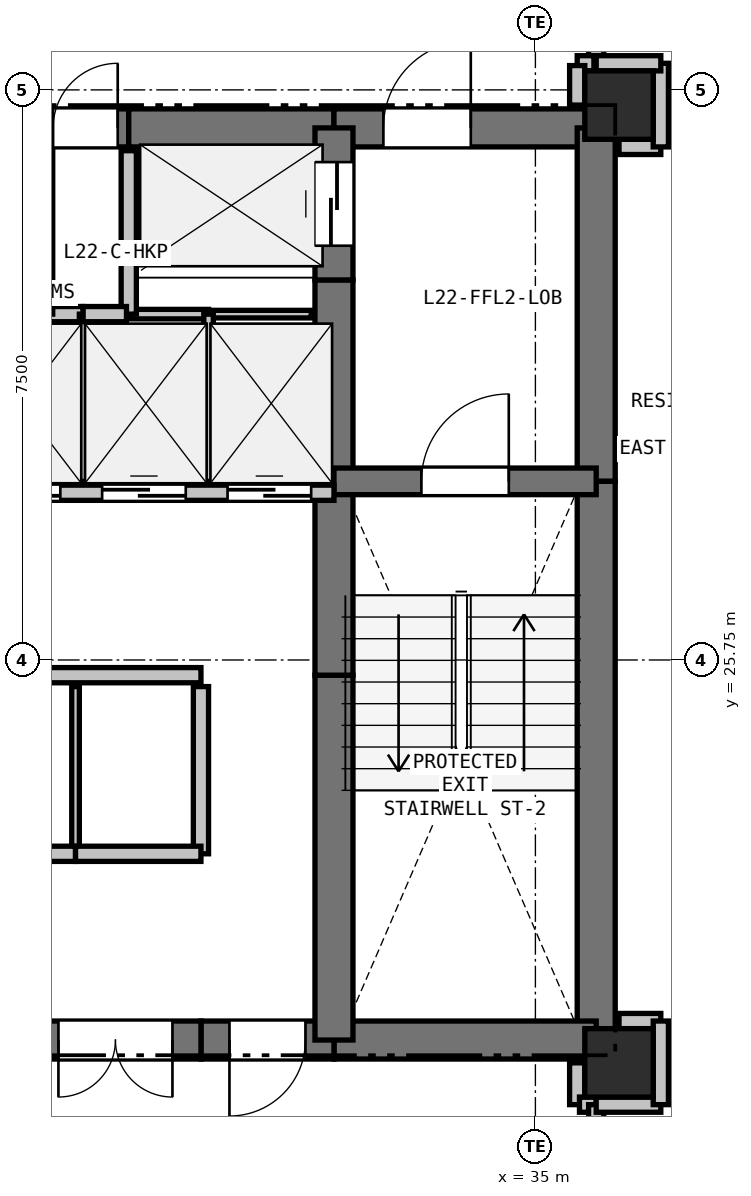
"""IFC4 building model, lengths in metres.
Left out: names, types, materials, properties, quantities, classifications, styles, units other than length and angle.
Written with IfcOpenShell. Run it as: python <this file> out.ifc"""

import sys

from ifc_helpers import new_model, si_unit, direction, frame, frame_2d, origin, origin_2d, place, context, subcontext, project, spatial, rectangle, extrude, element, fill, save


model = new_model("IFC4")
c1 = context("Model", 3, precision=1e-05, world=origin(), true_north=direction((0.0, 1.0)))
c2 = subcontext(c1, "Body", "Model", "MODEL_VIEW")
j1 = project(units=[si_unit("LENGTHUNIT", "METRE"), si_unit("PLANEANGLEUNIT", "RADIAN")], contexts=[c1])
p1 = place(None, origin())
s1 = spatial("IfcSite", under=j1, at=p1, CompositionType="ELEMENT")
p2 = place(p1, origin())
s2 = spatial("IfcBuilding", under=s1, at=p2, CompositionType="ELEMENT")
p3 = place(p2, frame((0.0, 0.0, 83.4)))
s3 = spatial("IfcBuildingStorey", under=s2, at=p3, CompositionType="ELEMENT", Elevation=83.4)
for number, where, z_axis, x_axis in (
    (1, (36.1, 33.05, 0.0), (0.0, 0.0, 1.0), (1.0, 0.0, 0.0)),
    (2, (36.1, 20.45, 0.0), (0.0, 0.0, 1.0), (1.0, 0.0, 0.0)),
):
    element("IfcColumn", number, at=place(p3, frame(where, z_axis=z_axis, x_axis=x_axis)), inside=s3, PredefinedType="COLUMN", context=c2, shape_type="SweptSolid", body=[
        extrude(rectangle(XDim=0.9, YDim=0.9, at=origin_2d()), origin(), (0.0, 0.0, 1.0), 3.3),
    ])
p4 = place(p3, frame((27.4, 32.75, 0.0), z_axis=(0.0, 0.0, 1.0), x_axis=(1.0, 0.0, 0.0)))
e3 = element("IfcWall", 3, at=p4, inside=s3, PredefinedType="SHEAR", context=c2, shape_type="SweptSolid", body=[
    extrude(rectangle(XDim=2.25, YDim=0.5, at=frame_2d((1.125, 0.0))), origin(), (0.0, 0.0, 1.0), 3.05),
])
p5 = place(p4, frame((0.17, 0.0, 0.0)))
e4 = element("IfcOpeningElement", 4, at=p5, cuts=e3, PredefinedType="OPENING", context=c2, shape_type="SweptSolid", body=[
    extrude(rectangle(XDim=0.85, YDim=2.1, at=frame_2d((0.425, 1.05))), frame((0.0, 0.26, 0.0), z_axis=(0.0, -1.0, 0.0), x_axis=(1.0, 0.0, 0.0)), (0.0, 0.0, 1.0), 0.52),
])
p6 = place(p4, frame((1.255, 0.0, 0.0)))
e5 = element("IfcOpeningElement", 5, at=p6, cuts=e3, PredefinedType="OPENING", context=c2, shape_type="SweptSolid", body=[
    extrude(rectangle(XDim=0.85, YDim=2.1, at=frame_2d((0.425, 1.05))), frame((0.0, 0.26, 0.0), z_axis=(0.0, -1.0, 0.0), x_axis=(1.0, 0.0, 0.0)), (0.0, 0.0, 1.0), 0.52),
])
p7 = place(p3, frame((29.65, 32.75, 0.0), z_axis=(0.0, 0.0, 1.0), x_axis=(1.0, 0.0, 0.0)))
e6 = element("IfcWall", 6, at=p7, inside=s3, PredefinedType="SHEAR", context=c2, shape_type="SweptSolid", body=[
    extrude(rectangle(XDim=2.7, YDim=0.5, at=frame_2d((1.35, 0.0))), origin(), (0.0, 0.0, 1.0), 3.05),
])
p8 = place(p3, frame((32.35, 32.75, 0.0), z_axis=(0.0, 0.0, 1.0), x_axis=(1.0, 0.0, 0.0)))
e7 = element("IfcWall", 7, at=p8, inside=s3, PredefinedType="SHEAR", context=c2, shape_type="SweptSolid", body=[
    extrude(rectangle(XDim=3.45, YDim=0.5, at=frame_2d((1.725, 0.0))), origin(), (0.0, 0.0, 1.0), 3.05),
])
p9 = place(p8, frame((0.65, 0.0, 0.0)))
e8 = element("IfcOpeningElement", 8, at=p9, cuts=e7, PredefinedType="OPENING", context=c2, shape_type="SweptSolid", body=[
    extrude(rectangle(XDim=1.15, YDim=2.15, at=frame_2d((0.575, 1.075))), frame((0.0, 0.26, 0.0), z_axis=(0.0, -1.0, 0.0), x_axis=(1.0, 0.0, 0.0)), (0.0, 0.0, 1.0), 0.52),
])
p10 = place(p3, frame((35.8, 32.75, 0.0), z_axis=(0.0, 0.0, 1.0), x_axis=(0.0, -1.0, 0.0)))
e9 = element("IfcWall", 9, at=p10, inside=s3, PredefinedType="SHEAR", context=c2, shape_type="SweptSolid", body=[
    extrude(rectangle(XDim=4.65, YDim=0.5, at=frame_2d((2.325, 0.0))), origin(), (0.0, 0.0, 1.0), 3.05),
])
p11 = place(p3, frame((35.8, 28.1, 0.0), z_axis=(0.0, 0.0, 1.0), x_axis=(0.0, -1.0, 0.0)))
e10 = element("IfcWall", 10, at=p11, inside=s3, PredefinedType="SHEAR", context=c2, shape_type="SweptSolid", body=[
    extrude(rectangle(XDim=7.35, YDim=0.5, at=frame_2d((3.675, 0.0))), origin(), (0.0, 0.0, 1.0), 3.05),
])
p12 = place(p3, frame((35.8, 20.75, 0.0), z_axis=(0.0, 0.0, 1.0), x_axis=(-1.0, 0.0, 0.0)))
e11 = element("IfcWall", 11, at=p12, inside=s3, PredefinedType="SHEAR", context=c2, shape_type="SweptSolid", body=[
    extrude(rectangle(XDim=3.45, YDim=0.5, at=frame_2d((1.725, 0.0))), origin(), (0.0, 0.0, 1.0), 3.05),
])
p13 = place(p3, frame((32.35, 20.75, 0.0), z_axis=(0.0, 0.0, 1.0), x_axis=(-1.0, 0.0, 0.0)))
e12 = element("IfcWall", 12, at=p13, inside=s3, PredefinedType="SHEAR", context=c2, shape_type="SweptSolid", body=[
    extrude(rectangle(XDim=1.75, YDim=0.5, at=frame_2d((0.875, 0.0))), origin(), (0.0, 0.0, 1.0), 3.05),
])
p14 = place(p13, frame((0.375, 0.0, 0.0)))
e13 = element("IfcOpeningElement", 13, at=p14, cuts=e12, PredefinedType="OPENING", context=c2, shape_type="SweptSolid", body=[
    extrude(rectangle(XDim=1.0, YDim=2.15, at=frame_2d((0.5, 1.075))), frame((0.0, 0.26, 0.0), z_axis=(0.0, -1.0, 0.0), x_axis=(1.0, 0.0, 0.0)), (0.0, 0.0, 1.0), 0.52),
])
p15 = place(p3, frame((30.6, 20.75, 0.0), z_axis=(0.0, 0.0, 1.0), x_axis=(-1.0, 0.0, 0.0)))
e14 = element("IfcWall", 14, at=p15, inside=s3, PredefinedType="SHEAR", context=c2, shape_type="SweptSolid", body=[
    extrude(rectangle(XDim=2.25, YDim=0.5, at=frame_2d((1.125, 0.0))), origin(), (0.0, 0.0, 1.0), 3.05),
])
p16 = place(p15, frame((0.375, 0.0, 0.0)))
e15 = element("IfcOpeningElement", 15, at=p16, cuts=e14, PredefinedType="OPENING", context=c2, shape_type="SweptSolid", body=[
    extrude(rectangle(XDim=1.5, YDim=2.2, at=frame_2d((0.75, 1.1))), frame((0.0, 0.26, 0.0), z_axis=(0.0, -1.0, 0.0), x_axis=(1.0, 0.0, 0.0)), (0.0, 0.0, 1.0), 0.52),
])
p17 = place(p3, frame((32.35, 20.75, 0.0), z_axis=(0.0, 0.0, 1.0), x_axis=(0.0, 1.0, 0.0)))
e16 = element("IfcWall", 16, at=p17, inside=s3, PredefinedType="SHEAR", context=c2, shape_type="SweptSolid", body=[
    extrude(rectangle(XDim=4.8, YDim=0.5, at=frame_2d((2.4, 0.0))), origin(), (0.0, 0.0, 1.0), 3.05),
])
p18 = place(p3, frame((32.35, 25.55, 0.0), z_axis=(0.0, 0.0, 1.0), x_axis=(0.0, 1.0, 0.0)))
e17 = element("IfcWall", 17, at=p18, inside=s3, PredefinedType="SHEAR", context=c2, shape_type="SweptSolid", body=[
    extrude(rectangle(XDim=2.4, YDim=0.5, at=frame_2d((1.2, 0.0))), origin(), (0.0, 0.0, 1.0), 3.05),
])
p19 = place(p3, frame((32.35, 27.95, 0.0), z_axis=(0.0, 0.0, 1.0), x_axis=(0.0, 1.0, 0.0)))
e18 = element("IfcWall", 18, at=p19, inside=s3, PredefinedType="SHEAR", context=c2, shape_type="SweptSolid", body=[
    extrude(rectangle(XDim=2.8, YDim=0.5, at=frame_2d((1.4, 0.0))), origin(), (0.0, 0.0, 1.0), 3.05),
])
p20 = place(p3, frame((32.35, 30.75, 0.0), z_axis=(0.0, 0.0, 1.0), x_axis=(0.0, 1.0, 0.0)))
e19 = element("IfcWall", 19, at=p20, inside=s3, PredefinedType="SHEAR", context=c2, shape_type="SweptSolid", body=[
    extrude(rectangle(XDim=2.0, YDim=0.5, at=frame_2d((1.0, 0.0))), origin(), (0.0, 0.0, 1.0), 3.05),
])
p21 = place(p20, frame((0.45, 0.0, 0.0)))
e20 = element("IfcOpeningElement", 20, at=p21, cuts=e19, PredefinedType="OPENING", context=c2, shape_type="SweptSolid", body=[
    extrude(rectangle(XDim=1.1, YDim=2.15, at=frame_2d((0.55, 1.075))), frame((0.0, 0.26, 0.0), z_axis=(0.0, -1.0, 0.0), x_axis=(1.0, 0.0, 0.0)), (0.0, 0.0, 1.0), 0.52),
])
p22 = place(p3, frame((32.35, 28.1, 0.0), z_axis=(0.0, 0.0, 1.0), x_axis=(1.0, 0.0, 0.0)))
e21 = element("IfcWall", 21, at=p22, inside=s3, PredefinedType="SHEAR", context=c2, shape_type="SweptSolid", body=[
    extrude(rectangle(XDim=3.45, YDim=0.35, at=frame_2d((1.725, 0.0))), origin(), (0.0, 0.0, 1.0), 3.05),
])
p23 = place(p22, frame((1.15, 0.0, 0.0)))
e22 = element("IfcOpeningElement", 22, at=p23, cuts=e21, PredefinedType="OPENING", context=c2, shape_type="SweptSolid", body=[
    extrude(rectangle(XDim=1.15, YDim=2.15, at=frame_2d((0.575, 1.075))), frame((0.0, 0.185, 0.0), z_axis=(0.0, -1.0, 0.0), x_axis=(1.0, 0.0, 0.0)), (0.0, 0.0, 1.0), 0.37),
])
p24 = place(p3, frame((25.65, 25.55, 0.0), z_axis=(0.0, 0.0, 1.0), x_axis=(1.0, 0.0, 0.0)))
e23 = element("IfcWall", 23, at=p24, inside=s3, PredefinedType="PARTITIONING", context=c2, shape_type="SweptSolid", body=[
    extrude(rectangle(XDim=4.95, YDim=0.2, at=frame_2d((2.475, 0.0))), origin(), (0.0, 0.0, 1.0), 3.05),
])
p25 = place(p3, frame((27.4, 27.95, 0.0), z_axis=(0.0, 0.0, 1.0), x_axis=(1.0, 0.0, 0.0)))
e24 = element("IfcWall", 24, at=p25, inside=s3, PredefinedType="PARTITIONING", context=c2, shape_type="SweptSolid", body=[
    extrude(rectangle(XDim=4.95, YDim=0.2, at=frame_2d((2.475, 0.0))), origin(), (0.0, 0.0, 1.0), 3.05),
])
p26 = place(p25, frame((0.25, 0.0, 0.0)))
e25 = element("IfcOpeningElement", 25, at=p26, cuts=e24, PredefinedType="OPENING", context=c2, shape_type="SweptSolid", body=[
    extrude(rectangle(XDim=1.1, YDim=2.15, at=frame_2d((0.55, 1.075))), frame((0.0, 0.11, 0.0), z_axis=(0.0, -1.0, 0.0), x_axis=(1.0, 0.0, 0.0)), (0.0, 0.0, 1.0), 0.22),
])
p27 = place(p25, frame((1.9, 0.0, 0.0)))
e26 = element("IfcOpeningElement", 26, at=p27, cuts=e24, PredefinedType="OPENING", context=c2, shape_type="SweptSolid", body=[
    extrude(rectangle(XDim=1.1, YDim=2.15, at=frame_2d((0.55, 1.075))), frame((0.0, 0.11, 0.0), z_axis=(0.0, -1.0, 0.0), x_axis=(1.0, 0.0, 0.0)), (0.0, 0.0, 1.0), 0.22),
])
p28 = place(p25, frame((3.55, 0.0, 0.0)))
e27 = element("IfcOpeningElement", 27, at=p28, cuts=e24, PredefinedType="OPENING", context=c2, shape_type="SweptSolid", body=[
    extrude(rectangle(XDim=1.1, YDim=2.15, at=frame_2d((0.55, 1.075))), frame((0.0, 0.11, 0.0), z_axis=(0.0, -1.0, 0.0), x_axis=(1.0, 0.0, 0.0)), (0.0, 0.0, 1.0), 0.22),
])
p29 = place(p3, frame((32.05, 30.3, 0.0), z_axis=(0.0, 0.0, 1.0), x_axis=(-1.0, 0.0, 0.0)))
e28 = element("IfcWall", 28, at=p29, inside=s3, PredefinedType="PARTITIONING", context=c2, shape_type="SweptSolid", body=[
    extrude(rectangle(XDim=1.35, YDim=0.1, at=frame_2d((0.675, 0.0))), origin(), (0.0, 0.0, 1.0), 3.05),
])
p30 = place(p3, frame((30.7, 30.3, 0.0), z_axis=(0.0, 0.0, 1.0), x_axis=(-1.0, 0.0, 0.0)))
e29 = element("IfcWall", 29, at=p30, inside=s3, PredefinedType="PARTITIONING", context=c2, shape_type="SweptSolid", body=[
    extrude(rectangle(XDim=1.05, YDim=0.125, at=frame_2d((0.525, 0.0))), origin(), (0.0, 0.0, 1.0), 3.05),
])
p31 = place(p3, frame((29.65, 30.3, 0.0), z_axis=(0.0, 0.0, 1.0), x_axis=(0.0, 1.0, 0.0)))
e30 = element("IfcWall", 30, at=p31, inside=s3, PredefinedType="PARTITIONING", context=c2, shape_type="SweptSolid", body=[
    extrude(rectangle(XDim=2.15, YDim=0.2, at=frame_2d((1.075, 0.0))), origin(), (0.0, 0.0, 1.0), 3.05),
])
p32 = place(p3, frame((28.95, 25.4, 0.0), z_axis=(0.0, 0.0, 1.0), x_axis=(0.0, -1.0, 0.0)))
e31 = element("IfcWall", 31, at=p32, inside=s3, PredefinedType="PARTITIONING", context=c2, shape_type="SweptSolid", body=[
    extrude(rectangle(XDim=2.2, YDim=0.1, at=frame_2d((1.1, 0.0))), origin(), (0.0, 0.0, 1.0), 3.05),
])
p33 = place(p3, frame((28.95, 23.2, 0.0), z_axis=(0.0, 0.0, 1.0), x_axis=(-1.0, 0.0, 0.0)))
e32 = element("IfcWall", 32, at=p33, inside=s3, PredefinedType="PARTITIONING", context=c2, shape_type="SweptSolid", body=[
    extrude(rectangle(XDim=0.57, YDim=0.2, at=frame_2d((0.285, 0.0))), origin(), (0.0, 0.0, 1.0), 3.05),
])
p34 = place(p3, frame((30.6, 25.4, 0.0), z_axis=(0.0, 0.0, 1.0), x_axis=(0.0, -1.0, 0.0)))
e33 = element("IfcWall", 33, at=p34, inside=s3, PredefinedType="PARTITIONING", context=c2, shape_type="SweptSolid", body=[
    extrude(rectangle(XDim=2.2, YDim=0.2, at=frame_2d((1.1, 0.0))), origin(), (0.0, 0.0, 1.0), 3.05),
])
p35 = place(p3, frame((30.6, 23.2, 0.0), z_axis=(0.0, 0.0, 1.0), x_axis=(-1.0, 0.0, 0.0)))
e34 = element("IfcWall", 34, at=p35, inside=s3, PredefinedType="PARTITIONING", context=c2, shape_type="SweptSolid", body=[
    extrude(rectangle(XDim=1.65, YDim=0.2, at=frame_2d((0.825, 0.0))), origin(), (0.0, 0.0, 1.0), 3.05),
])
p36 = place(p3, frame((28.55, 30.3, 0.0), z_axis=(0.0, 0.0, 1.0), x_axis=(1.0, 0.0, 0.0)))
e35 = element("IfcWall", 35, at=p36, inside=s3, PredefinedType="PARTITIONING", context=c2, shape_type="SweptSolid", body=[
    extrude(rectangle(XDim=0.5, YDim=0.2, at=frame_2d((0.25, 0.0))), origin(), (0.0, 0.0, 1.0), 3.05),
])
p37 = place(p3, frame((29.05, 30.3, 0.0), z_axis=(0.0, 0.0, 1.0), x_axis=(0.0, -1.0, 0.0)))
e36 = element("IfcWall", 36, at=p37, inside=s3, PredefinedType="PARTITIONING", context=c2, shape_type="SweptSolid", body=[
    extrude(rectangle(XDim=2.2, YDim=0.1, at=frame_2d((1.1, 0.0))), origin(), (0.0, 0.0, 1.0), 3.05),
])
p38 = place(p3, frame((29.05, 30.3, 0.0), z_axis=(0.0, 0.0, 1.0), x_axis=(1.0, 0.0, 0.0)))
e37 = element("IfcWall", 37, at=p38, inside=s3, PredefinedType="PARTITIONING", context=c2, shape_type="SweptSolid", body=[
    extrude(rectangle(XDim=0.57, YDim=0.2, at=frame_2d((0.285, 0.0))), origin(), (0.0, 0.0, 1.0), 3.05),
])
p39 = place(p3, frame((30.7, 30.3, 0.0), z_axis=(0.0, 0.0, 1.0), x_axis=(0.0, -1.0, 0.0)))
e38 = element("IfcWall", 38, at=p39, inside=s3, PredefinedType="PARTITIONING", context=c2, shape_type="SweptSolid", body=[
    extrude(rectangle(XDim=2.2, YDim=0.125, at=frame_2d((1.1, 0.0))), origin(), (0.0, 0.0, 1.0), 3.05),
])
p40 = place(p3, frame((35.55, 20.45, 0.0), z_axis=(0.0, 0.0, 1.0), x_axis=(0.0, -1.0, 0.0)))
e39 = element("IfcWall", 39, at=p40, inside=s3, PredefinedType="PARTITIONING", context=c2, shape_type="SweptSolid", body=[
    extrude(rectangle(XDim=0.55, YDim=0.2, at=frame_2d((0.275, 0.0))), origin(), (0.0, 0.0, 1.0), 2.498),
])
p41 = place(p3, frame((35.58, 19.9, 0.0), z_axis=(0.0, 0.0, 1.0), x_axis=(1.0, 0.0, 0.0)))
e40 = element("IfcWall", 40, at=p41, inside=s3, PredefinedType="PARTITIONING", context=c2, shape_type="SweptSolid", body=[
    extrude(rectangle(XDim=0.22, YDim=0.2, at=frame_2d((0.11, 0.0))), origin(), (0.0, 0.0, 1.0), 3.05),
])
p42 = place(p3, frame((35.8, 19.9, 0.0), z_axis=(0.0, 0.0, 1.0), x_axis=(0.0, -1.0, 0.0)))
e41 = element("IfcWall", 41, at=p42, inside=s3, PredefinedType="PARTITIONING", context=c2, shape_type="SweptSolid", body=[
    extrude(rectangle(XDim=1.75, YDim=0.2, at=frame_2d((0.875, 0.0))), origin(), (0.0, 0.0, 1.0), 3.05),
])
p43 = place(p42, frame((0.375, 0.0, 0.0)))
e42 = element("IfcOpeningElement", 42, at=p43, cuts=e41, PredefinedType="OPENING", context=c2, shape_type="SweptSolid", body=[
    extrude(rectangle(XDim=1.0, YDim=2.15, at=frame_2d((0.5, 1.075))), frame((0.0, 0.11, 0.0), z_axis=(0.0, -1.0, 0.0), x_axis=(1.0, 0.0, 0.0)), (0.0, 0.0, 1.0), 0.22),
])
p44 = place(p3, frame((35.8, 35.35, 0.0), z_axis=(0.0, 0.0, 1.0), x_axis=(0.0, -1.0, 0.0)))
e43 = element("IfcWall", 43, at=p44, inside=s3, PredefinedType="PARTITIONING", context=c2, shape_type="SweptSolid", body=[
    extrude(rectangle(XDim=1.75, YDim=0.2, at=frame_2d((0.875, 0.0))), origin(), (0.0, 0.0, 1.0), 3.05),
])
p45 = place(p44, frame((0.375, 0.0, 0.0)))
e44 = element("IfcOpeningElement", 44, at=p45, cuts=e43, PredefinedType="OPENING", context=c2, shape_type="SweptSolid", body=[
    extrude(rectangle(XDim=1.0, YDim=2.15, at=frame_2d((0.5, 1.075))), frame((0.0, 0.11, 0.0), z_axis=(0.0, -1.0, 0.0), x_axis=(1.0, 0.0, 0.0)), (0.0, 0.0, 1.0), 0.22),
])
p46 = place(p3, frame((35.77, 33.6, 0.0), z_axis=(0.0, 0.0, 1.0), x_axis=(-1.0, 0.0, 0.0)))
e45 = element("IfcWall", 45, at=p46, inside=s3, PredefinedType="PARTITIONING", context=c2, shape_type="SweptSolid", body=[
    extrude(rectangle(XDim=0.22, YDim=0.2, at=frame_2d((0.11, 0.0))), origin(), (0.0, 0.0, 1.0), 3.05),
])
p47 = place(p3, frame((35.55, 33.57, 0.0), z_axis=(0.0, 0.0, 1.0), x_axis=(0.0, -1.0, 0.0)))
e46 = element("IfcWall", 46, at=p47, inside=s3, PredefinedType="PARTITIONING", context=c2, shape_type="SweptSolid", body=[
    extrude(rectangle(XDim=0.52, YDim=0.2, at=frame_2d((0.26, 0.0))), origin(), (0.0, 0.0, 1.0), 2.498),
])
for number, where, z_axis, x_axis in (
    (47, (36.65, 21.0, 0.0), (0.0, 0.0, 1.0), (-1.0, 0.0, 0.0)),
    (48, (36.1, 32.5, 0.0), (0.0, 0.0, 1.0), (1.0, 0.0, 0.0)),
):
    element("IfcWall", number, at=place(p3, frame(where, z_axis=z_axis, x_axis=x_axis)), inside=s3, PredefinedType="PARTITIONING", context=c2, shape_type="SweptSolid", body=[
        extrude(rectangle(XDim=0.55, YDim=0.2, at=frame_2d((0.275, 0.0))), origin(), (0.0, 0.0, 1.0), 2.498),
    ])
p48 = place(p3, frame((36.65, 32.5, 0.0), z_axis=(0.0, 0.0, 1.0), x_axis=(0.0, 1.0, 0.0)))
e49 = element("IfcWall", 49, at=p48, inside=s3, PredefinedType="PARTITIONING", context=c2, shape_type="SweptSolid", body=[
    extrude(rectangle(XDim=1.1, YDim=0.2, at=frame_2d((0.55, 0.0))), origin(), (0.0, 0.0, 1.0), 2.423),
])
for number, where, z_axis, x_axis in (
    (50, (36.65, 33.6, 0.0), (0.0, 0.0, 1.0), (-1.0, 0.0, 0.0)),
    (51, (35.8, 19.9, 0.0), (0.0, 0.0, 1.0), (1.0, 0.0, 0.0)),
):
    element("IfcWall", number, at=place(p3, frame(where, z_axis=z_axis, x_axis=x_axis)), inside=s3, PredefinedType="PARTITIONING", context=c2, shape_type="SweptSolid", body=[
        extrude(rectangle(XDim=0.85, YDim=0.2, at=frame_2d((0.425, 0.0))), origin(), (0.0, 0.0, 1.0), 2.423),
    ])
p49 = place(p3, frame((36.65, 19.9, 0.0), z_axis=(0.0, 0.0, 1.0), x_axis=(0.0, 1.0, 0.0)))
e52 = element("IfcWall", 52, at=p49, inside=s3, PredefinedType="PARTITIONING", context=c2, shape_type="SweptSolid", body=[
    extrude(rectangle(XDim=1.1, YDim=0.2, at=frame_2d((0.55, 0.0))), origin(), (0.0, 0.0, 1.0), 3.05),
])
p50 = place(p3, frame((28.55, 32.45, 0.0), z_axis=(0.0, 0.0, 1.0), x_axis=(0.0, -1.0, 0.0)))
e53 = element("IfcWall", 53, at=p50, inside=s3, PredefinedType="PARTITIONING", context=c2, shape_type="SweptSolid", body=[
    extrude(rectangle(XDim=2.15, YDim=0.2, at=frame_2d((1.075, 0.0))), origin(), (0.0, 0.0, 1.0), 3.05),
])
p51 = place(p26, origin())
e54 = element("IfcDoor", 54, at=p51, inside=s3, OperationType="SLIDING_TO_LEFT", PredefinedType="DOOR", context=c2, shape_type="SweptSolid", body=[
    extrude(rectangle(XDim=1.1, YDim=2.15, at=frame_2d((0.55, 1.075))), frame((0.0, 0.025, 0.0), z_axis=(0.0, -1.0, 0.0), x_axis=(1.0, 0.0, 0.0)), (0.0, 0.0, 1.0), 0.05),
])
fill(e25, e54)
p52 = place(p27, origin())
e55 = element("IfcDoor", 55, at=p52, inside=s3, OperationType="SLIDING_TO_LEFT", PredefinedType="DOOR", context=c2, shape_type="SweptSolid", body=[
    extrude(rectangle(XDim=1.1, YDim=2.15, at=frame_2d((0.55, 1.075))), frame((0.0, 0.025, 0.0), z_axis=(0.0, -1.0, 0.0), x_axis=(1.0, 0.0, 0.0)), (0.0, 0.0, 1.0), 0.05),
])
fill(e26, e55)
p53 = place(p28, origin())
e56 = element("IfcDoor", 56, at=p53, inside=s3, OperationType="SLIDING_TO_LEFT", PredefinedType="DOOR", context=c2, shape_type="SweptSolid", body=[
    extrude(rectangle(XDim=1.1, YDim=2.15, at=frame_2d((0.55, 1.075))), frame((0.0, 0.025, 0.0), z_axis=(0.0, -1.0, 0.0), x_axis=(1.0, 0.0, 0.0)), (0.0, 0.0, 1.0), 0.05),
])
fill(e27, e56)
p54 = place(p14, origin())
e57 = element("IfcDoor", 57, at=p54, inside=s3, OperationType="SINGLE_SWING_RIGHT", PredefinedType="DOOR", context=c2, shape_type="SweptSolid", body=[
    extrude(rectangle(XDim=1.0, YDim=2.15, at=frame_2d((0.5, 1.075))), frame((0.0, 0.025, 0.0), z_axis=(0.0, -1.0, 0.0), x_axis=(1.0, 0.0, 0.0)), (0.0, 0.0, 1.0), 0.05),
])
fill(e13, e57)
p55 = place(p21, origin())
e58 = element("IfcDoor", 58, at=p55, inside=s3, OperationType="SLIDING_TO_LEFT", PredefinedType="DOOR", context=c2, shape_type="SweptSolid", body=[
    extrude(rectangle(XDim=1.1, YDim=2.15, at=frame_2d((0.55, 1.075))), frame((0.0, 0.025, 0.0), z_axis=(0.0, -1.0, 0.0), x_axis=(1.0, 0.0, 0.0)), (0.0, 0.0, 1.0), 0.05),
])
fill(e20, e58)
p56 = place(p23, origin())
e59 = element("IfcDoor", 59, at=p56, inside=s3, OperationType="SINGLE_SWING_RIGHT", PredefinedType="DOOR", context=c2, shape_type="SweptSolid", body=[
    extrude(rectangle(XDim=1.15, YDim=2.15, at=frame_2d((0.575, 1.075))), frame((0.0, 0.025, 0.0), z_axis=(0.0, -1.0, 0.0), x_axis=(1.0, 0.0, 0.0)), (0.0, 0.0, 1.0), 0.05),
])
fill(e22, e59)
p57 = place(p9, origin())
e60 = element("IfcDoor", 60, at=p57, inside=s3, OperationType="SINGLE_SWING_RIGHT", PredefinedType="DOOR", context=c2, shape_type="SweptSolid", body=[
    extrude(rectangle(XDim=1.15, YDim=2.15, at=frame_2d((0.575, 1.075))), frame((0.0, 0.025, 0.0), z_axis=(0.0, -1.0, 0.0), x_axis=(1.0, 0.0, 0.0)), (0.0, 0.0, 1.0), 0.05),
])
fill(e8, e60)
p58 = place(p16, origin())
e61 = element("IfcDoor", 61, at=p58, inside=s3, OperationType="DOUBLE_DOOR_SINGLE_SWING", PredefinedType="DOOR", context=c2, shape_type="SweptSolid", body=[
    extrude(rectangle(XDim=1.5, YDim=2.2, at=frame_2d((0.75, 1.1))), frame((0.0, 0.025, 0.0), z_axis=(0.0, -1.0, 0.0), x_axis=(1.0, 0.0, 0.0)), (0.0, 0.0, 1.0), 0.05),
])
fill(e15, e61)
p59 = place(p6, origin())
e62 = element("IfcDoor", 62, at=p59, inside=s3, OperationType="SINGLE_SWING_RIGHT", PredefinedType="DOOR", context=c2, shape_type="SweptSolid", body=[
    extrude(rectangle(XDim=0.85, YDim=2.1, at=frame_2d((0.425, 1.05))), frame((0.0, 0.025, 0.0), z_axis=(0.0, -1.0, 0.0), x_axis=(1.0, 0.0, 0.0)), (0.0, 0.0, 1.0), 0.05),
])
fill(e5, e62)
save(model, sys.argv[1])
